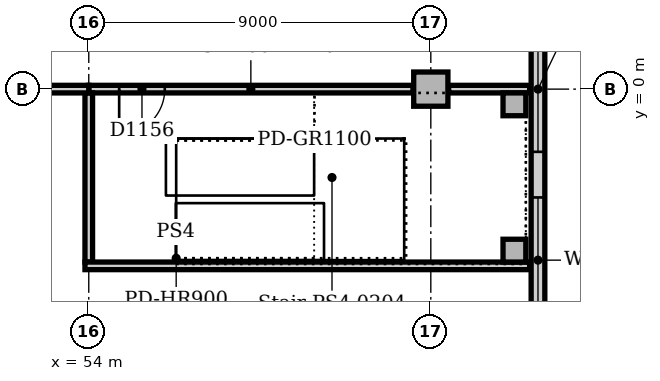
"""IFC4 building model, lengths in metres.
Left out: names, types, materials, properties, quantities, classifications, styles, units other than length and angle.
Written with IfcOpenShell. Run it as: python <this file> out.ifc"""

import sys

from ifc_helpers import new_model, si_unit, direction, frame, frame_2d, origin, origin_2d, place, context, subcontext, project, spatial, rectangle, extrude, element, fill, save


model = new_model("IFC4")
c1 = context("Model", 3, precision=1e-05, world=origin(), true_north=direction((0.0, 1.0)))
c2 = subcontext(c1, "Body", "Model", "MODEL_VIEW")
j1 = project(units=[si_unit("LENGTHUNIT", "METRE"), si_unit("PLANEANGLEUNIT", "RADIAN")], contexts=[c1])
p1 = place(None, origin())
s1 = spatial("IfcSite", under=j1, at=p1, CompositionType="ELEMENT")
p2 = place(p1, origin())
s2 = spatial("IfcBuilding", under=s1, at=p2, CompositionType="ELEMENT")
p3 = place(p2, frame((0.0, 0.0, 11.0)))
s3 = spatial("IfcBuildingStorey", under=s2, at=p3, CompositionType="ELEMENT", Elevation=11.0)
p4 = place(p3, frame((63.0, 0.0, 0.0), z_axis=(0.0, 0.0, 1.0), x_axis=(1.0, 0.0, 0.0)))
e1 = element("IfcColumn", 1, at=p4, inside=s3, PredefinedType="COLUMN", context=c2, shape_type="SweptSolid", body=[
    extrude(rectangle(XDim=0.9, YDim=0.9, at=origin_2d()), origin(), (0.0, 0.0, 1.0), 4.7),
])
p5 = place(p3, frame((65.82, -9.0, 0.0), z_axis=(0.0, 0.0, 1.0), x_axis=(0.0, 1.0, 0.0)))
e2 = element("IfcWall", 2, at=p5, inside=s3, PredefinedType="STANDARD", context=c2, shape_type="SweptSolid", body=[
    extrude(rectangle(XDim=63.0, YDim=0.36, at=frame_2d((31.5, 0.0))), origin(), (0.0, 0.0, 1.0), 4.7),
])
p6 = place(p5, frame((2.85, 0.0, 0.9)))
e3 = element("IfcOpeningElement", 3, at=p6, cuts=e2, PredefinedType="OPENING", context=c2, shape_type="SweptSolid", body=[
    extrude(rectangle(XDim=3.3, YDim=2.4, at=frame_2d((1.65, 1.2))), frame((0.0, 0.19, 0.0), z_axis=(0.0, -1.0, 0.0), x_axis=(1.0, 0.0, 0.0)), (0.0, 0.0, 1.0), 0.38),
])
p7 = place(p5, frame((7.35, 0.0, 0.9)))
e4 = element("IfcOpeningElement", 4, at=p7, cuts=e2, PredefinedType="OPENING", context=c2, shape_type="SweptSolid", body=[
    extrude(rectangle(XDim=3.3, YDim=2.4, at=frame_2d((1.65, 1.2))), frame((0.0, 0.19, 0.0), z_axis=(0.0, -1.0, 0.0), x_axis=(1.0, 0.0, 0.0)), (0.0, 0.0, 1.0), 0.38),
])
p8 = place(p5, frame((11.85, 0.0, 0.9)))
e5 = element("IfcOpeningElement", 5, at=p8, cuts=e2, PredefinedType="OPENING", context=c2, shape_type="SweptSolid", body=[
    extrude(rectangle(XDim=3.3, YDim=2.4, at=frame_2d((1.65, 1.2))), frame((0.0, 0.19, 0.0), z_axis=(0.0, -1.0, 0.0), x_axis=(1.0, 0.0, 0.0)), (0.0, 0.0, 1.0), 0.38),
])
p9 = place(p5, frame((16.35, 0.0, 0.9)))
e6 = element("IfcOpeningElement", 6, at=p9, cuts=e2, PredefinedType="OPENING", context=c2, shape_type="SweptSolid", body=[
    extrude(rectangle(XDim=3.3, YDim=2.4, at=frame_2d((1.65, 1.2))), frame((0.0, 0.19, 0.0), z_axis=(0.0, -1.0, 0.0), x_axis=(1.0, 0.0, 0.0)), (0.0, 0.0, 1.0), 0.38),
])
p10 = place(p5, frame((20.85, 0.0, 0.9)))
e7 = element("IfcOpeningElement", 7, at=p10, cuts=e2, PredefinedType="OPENING", context=c2, shape_type="SweptSolid", body=[
    extrude(rectangle(XDim=3.3, YDim=2.4, at=frame_2d((1.65, 1.2))), frame((0.0, 0.19, 0.0), z_axis=(0.0, -1.0, 0.0), x_axis=(1.0, 0.0, 0.0)), (0.0, 0.0, 1.0), 0.38),
])
p11 = place(p5, frame((25.35, 0.0, 0.9)))
e8 = element("IfcOpeningElement", 8, at=p11, cuts=e2, PredefinedType="OPENING", context=c2, shape_type="SweptSolid", body=[
    extrude(rectangle(XDim=3.3, YDim=2.4, at=frame_2d((1.65, 1.2))), frame((0.0, 0.19, 0.0), z_axis=(0.0, -1.0, 0.0), x_axis=(1.0, 0.0, 0.0)), (0.0, 0.0, 1.0), 0.38),
])
p12 = place(p5, frame((29.85, 0.0, 0.9)))
e9 = element("IfcOpeningElement", 9, at=p12, cuts=e2, PredefinedType="OPENING", context=c2, shape_type="SweptSolid", body=[
    extrude(rectangle(XDim=3.3, YDim=2.4, at=frame_2d((1.65, 1.2))), frame((0.0, 0.19, 0.0), z_axis=(0.0, -1.0, 0.0), x_axis=(1.0, 0.0, 0.0)), (0.0, 0.0, 1.0), 0.38),
])
p13 = place(p5, frame((34.35, 0.0, 0.9)))
e10 = element("IfcOpeningElement", 10, at=p13, cuts=e2, PredefinedType="OPENING", context=c2, shape_type="SweptSolid", body=[
    extrude(rectangle(XDim=3.3, YDim=2.4, at=frame_2d((1.65, 1.2))), frame((0.0, 0.19, 0.0), z_axis=(0.0, -1.0, 0.0), x_axis=(1.0, 0.0, 0.0)), (0.0, 0.0, 1.0), 0.38),
])
p14 = place(p5, frame((38.85, 0.0, 0.9)))
e11 = element("IfcOpeningElement", 11, at=p14, cuts=e2, PredefinedType="OPENING", context=c2, shape_type="SweptSolid", body=[
    extrude(rectangle(XDim=3.3, YDim=2.4, at=frame_2d((1.65, 1.2))), frame((0.0, 0.19, 0.0), z_axis=(0.0, -1.0, 0.0), x_axis=(1.0, 0.0, 0.0)), (0.0, 0.0, 1.0), 0.38),
])
p15 = place(p5, frame((43.35, 0.0, 0.9)))
e12 = element("IfcOpeningElement", 12, at=p15, cuts=e2, PredefinedType="OPENING", context=c2, shape_type="SweptSolid", body=[
    extrude(rectangle(XDim=3.3, YDim=2.4, at=frame_2d((1.65, 1.2))), frame((0.0, 0.19, 0.0), z_axis=(0.0, -1.0, 0.0), x_axis=(1.0, 0.0, 0.0)), (0.0, 0.0, 1.0), 0.38),
])
p16 = place(p5, frame((47.85, 0.0, 0.9)))
e13 = element("IfcOpeningElement", 13, at=p16, cuts=e2, PredefinedType="OPENING", context=c2, shape_type="SweptSolid", body=[
    extrude(rectangle(XDim=3.3, YDim=2.4, at=frame_2d((1.65, 1.2))), frame((0.0, 0.19, 0.0), z_axis=(0.0, -1.0, 0.0), x_axis=(1.0, 0.0, 0.0)), (0.0, 0.0, 1.0), 0.38),
])
p17 = place(p5, frame((52.35, 0.0, 0.9)))
e14 = element("IfcOpeningElement", 14, at=p17, cuts=e2, PredefinedType="OPENING", context=c2, shape_type="SweptSolid", body=[
    extrude(rectangle(XDim=3.3, YDim=2.4, at=frame_2d((1.65, 1.2))), frame((0.0, 0.19, 0.0), z_axis=(0.0, -1.0, 0.0), x_axis=(1.0, 0.0, 0.0)), (0.0, 0.0, 1.0), 0.38),
])
p18 = place(p5, frame((56.85, 0.0, 0.9)))
e15 = element("IfcOpeningElement", 15, at=p18, cuts=e2, PredefinedType="OPENING", context=c2, shape_type="SweptSolid", body=[
    extrude(rectangle(XDim=3.3, YDim=2.4, at=frame_2d((1.65, 1.2))), frame((0.0, 0.19, 0.0), z_axis=(0.0, -1.0, 0.0), x_axis=(1.0, 0.0, 0.0)), (0.0, 0.0, 1.0), 0.38),
])
for number, where, z_axis, x_axis in (
    (16, (65.2, -4.25, 0.0), (0.0, 0.0, 1.0), (1.0, 0.0, 0.0)),
    (17, (65.2, -0.4, 0.0), (0.0, 0.0, 1.0), (1.0, 0.0, 0.0)),
):
    element("IfcColumn", number, at=place(p3, frame(where, z_axis=z_axis, x_axis=x_axis)), inside=s3, PredefinedType="COLUMN", context=c2, shape_type="SweptSolid", body=[
        extrude(rectangle(XDim=0.6, YDim=0.6, at=origin_2d()), origin(), (0.0, 0.0, 1.0), 5.0),
    ])
p19 = place(p3, frame((54.0, 0.0, 0.0), z_axis=(0.0, 0.0, 1.0), x_axis=(1.0, 0.0, 0.0)))
e18 = element("IfcWall", 18, at=p19, inside=s3, PredefinedType="SOLIDWALL", context=c2, shape_type="SweptSolid", body=[
    extrude(rectangle(XDim=8.53, YDim=0.2, at=frame_2d((4.265, 0.0))), origin(), (0.0, 0.0, 1.0), 4.7),
])
p20 = place(p19, frame((0.8, 0.0, 0.0)))
e19 = element("IfcOpeningElement", 19, at=p20, cuts=e18, PredefinedType="OPENING", context=c2, shape_type="SweptSolid", body=[
    extrude(rectangle(XDim=1.2, YDim=2.1, at=frame_2d((0.6, 1.05))), frame((0.0, 0.11, 0.0), z_axis=(0.0, -1.0, 0.0), x_axis=(1.0, 0.0, 0.0)), (0.0, 0.0, 1.0), 0.22),
])
p21 = place(p3, frame((63.47, 0.0, 0.0), z_axis=(0.0, 0.0, 1.0), x_axis=(1.0, 0.0, 0.0)))
e20 = element("IfcWall", 20, at=p21, inside=s3, PredefinedType="SOLIDWALL", context=c2, shape_type="SweptSolid", body=[
    extrude(rectangle(XDim=2.13, YDim=0.2, at=frame_2d((1.065, 0.0))), origin(), (0.0, 0.0, 1.0), 4.7),
])
p22 = place(p3, frame((54.0, -4.55, 0.0), z_axis=(0.0, 0.0, 1.0), x_axis=(0.0, 1.0, 0.0)))
e21 = element("IfcWall", 21, at=p22, inside=s3, PredefinedType="SOLIDWALL", context=c2, shape_type="SweptSolid", body=[
    extrude(rectangle(XDim=4.45, YDim=0.2, at=frame_2d((2.225, 0.0))), origin(), (0.0, 0.0, 1.0), 4.7),
])
p23 = place(p3, frame((53.9, -4.65, 0.0), z_axis=(0.0, 0.0, 1.0), x_axis=(1.0, 0.0, 0.0)))
e22 = element("IfcWall", 22, at=p23, inside=s3, PredefinedType="SOLIDWALL", context=c2, shape_type="SweptSolid", body=[
    extrude(rectangle(XDim=11.7, YDim=0.2, at=frame_2d((5.85, 0.0))), origin(), (0.0, 0.0, 1.0), 4.7),
])
p24 = place(p3, frame((45.0, 0.0, 0.0), z_axis=(0.0, 0.0, 1.0), x_axis=(1.0, 0.0, 0.0)))
e23 = element("IfcWall", 23, at=p24, inside=s3, PredefinedType="PARTITIONING", context=c2, shape_type="SweptSolid", body=[
    extrude(rectangle(XDim=9.0, YDim=0.2, at=frame_2d((4.5, 0.0))), origin(), (0.0, 0.0, 1.0), 4.7),
])
p25 = place(p24, frame((4.6, 0.0, 0.0)))
e24 = element("IfcOpeningElement", 24, at=p25, cuts=e23, PredefinedType="OPENING", context=c2, shape_type="SweptSolid", body=[
    extrude(rectangle(XDim=1.0, YDim=2.1, at=frame_2d((0.5, 1.05))), frame((0.0, 0.11, 0.0), z_axis=(0.0, -1.0, 0.0), x_axis=(1.0, 0.0, 0.0)), (0.0, 0.0, 1.0), 0.22),
])
p26 = place(p6, origin())
e25 = element("IfcWindow", 25, at=p26, inside=s3, PartitioningType="SINGLE_PANEL", PredefinedType="WINDOW", context=c2, shape_type="SweptSolid", body=[
    extrude(rectangle(XDim=3.3, YDim=2.4, at=frame_2d((1.65, 1.2))), frame((0.0, 0.13, 0.0), z_axis=(0.0, -1.0, 0.0), x_axis=(1.0, 0.0, 0.0)), (0.0, 0.0, 1.0), 0.06),
])
fill(e3, e25)
p27 = place(p7, origin())
e26 = element("IfcWindow", 26, at=p27, inside=s3, PartitioningType="SINGLE_PANEL", PredefinedType="WINDOW", context=c2, shape_type="SweptSolid", body=[
    extrude(rectangle(XDim=3.3, YDim=2.4, at=frame_2d((1.65, 1.2))), frame((0.0, 0.13, 0.0), z_axis=(0.0, -1.0, 0.0), x_axis=(1.0, 0.0, 0.0)), (0.0, 0.0, 1.0), 0.06),
])
fill(e4, e26)
p28 = place(p20, frame((1.2, 0.0, 0.0), z_axis=(0.0, 0.0, 1.0), x_axis=(-1.0, 0.0, 0.0)))
e27 = element("IfcDoor", 27, at=p28, inside=s3, OperationType="SINGLE_SWING_RIGHT", PredefinedType="DOOR", context=c2, shape_type="SweptSolid", body=[
    extrude(rectangle(XDim=1.2, YDim=2.1, at=frame_2d((0.6, 1.05))), frame((0.0, 0.025, 0.0), z_axis=(0.0, -1.0, 0.0), x_axis=(1.0, 0.0, 0.0)), (0.0, 0.0, 1.0), 0.05),
])
fill(e19, e27)
save(model, sys.argv[1])
